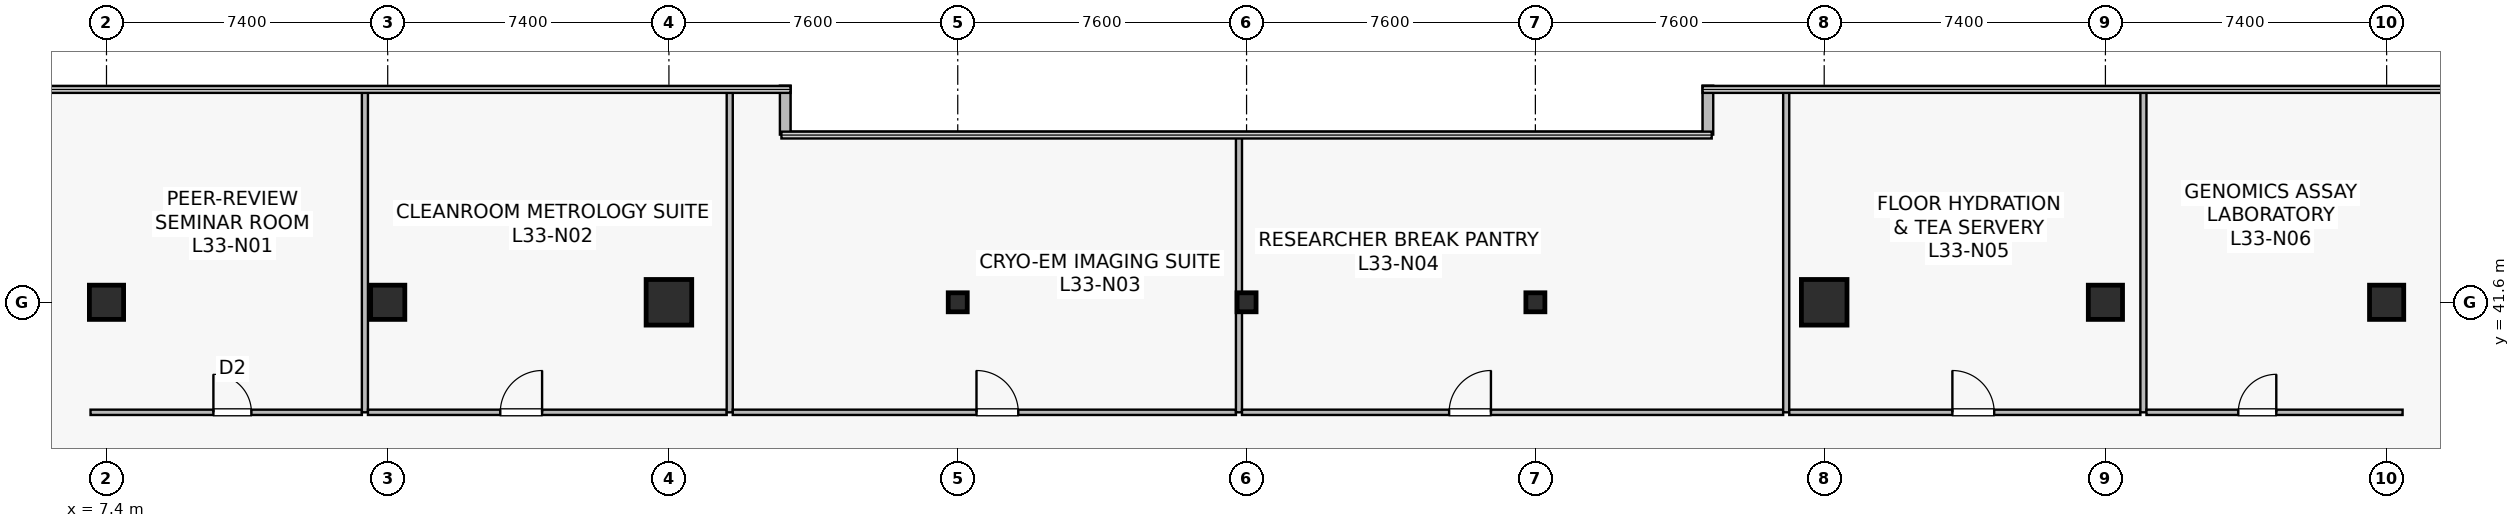
"""IFC4 building model, lengths in metres.
Left out: names, types, materials, properties, quantities, classifications, styles, units other than length and angle.
Written with IfcOpenShell. Run it as: python <this file> out.ifc"""

import sys

from ifc_helpers import new_model, si_unit, direction, frame, frame_2d, origin, origin_2d, place, context, subcontext, project, spatial, rectangle, hollow_rectangle, extrude, source, transform, mapped, element, fill, save


model = new_model("IFC4")
c1 = context("Model", 3, precision=1e-05, world=origin(), true_north=direction((0.0, 1.0)))
c2 = subcontext(c1, "Body", "Model", "MODEL_VIEW")
j1 = project(units=[si_unit("LENGTHUNIT", "METRE"), si_unit("PLANEANGLEUNIT", "RADIAN")], contexts=[c1])
p1 = place(None, origin())
s1 = spatial("IfcSite", under=j1, at=p1, CompositionType="ELEMENT")
p2 = place(p1, origin())
s2 = spatial("IfcBuilding", under=s1, at=p2, CompositionType="ELEMENT")
p3 = place(p2, frame((0.0, 0.0, 137.9)))
s3 = spatial("IfcBuildingStorey", under=s2, at=p3, CompositionType="ELEMENT", Elevation=137.9)
m1 = source(origin(), c2, "Body", "SweptSolid", [
    extrude(rectangle(XDim=0.9, YDim=0.9, at=origin_2d()), origin(), (0.0, 0.0, 1.0), 4.1),
])
p4 = place(p3, frame((14.8, 41.6, 0.0), z_axis=(0.0, 0.0, 1.0), x_axis=(1.0, 0.0, 0.0)))
e1 = element("IfcColumn", 1, at=p4, inside=s3, PredefinedType="COLUMN", context=c2, shape_type="MappedRepresentation", body=[
    mapped(m1, transform((0.0, 0.0, 0.0), scale=1.0)),
])
m2 = source(origin(), c2, "Body", "SweptSolid", [
    extrude(rectangle(XDim=1.2, YDim=1.2, at=origin_2d()), origin(), (0.0, 0.0, 1.0), 4.1),
])
for number, where, z_axis, x_axis in (
    (2, (22.2, 41.6, 0.0), (0.0, 0.0, 1.0), (1.0, 0.0, 0.0)),
    (3, (52.6, 41.6, 0.0), (0.0, 0.0, 1.0), (1.0, 0.0, 0.0)),
):
    element("IfcColumn", number, at=place(p3, frame(where, z_axis=z_axis, x_axis=x_axis)), inside=s3, PredefinedType="COLUMN", context=c2, shape_type="MappedRepresentation", body=[
        mapped(m2, transform((0.0, 0.0, 0.0), scale=1.0)),
    ])
for number, where, z_axis, x_axis in (
    (4, (60.0, 41.6, 0.0), (0.0, 0.0, 1.0), (1.0, 0.0, 0.0)),
    (5, (7.4, 41.6, 0.0), (0.0, 0.0, 1.0), (1.0, 0.0, 0.0)),
    (6, (67.4, 41.6, 0.0), (0.0, 0.0, 1.0), (1.0, 0.0, 0.0)),
):
    element("IfcColumn", number, at=place(p3, frame(where, z_axis=z_axis, x_axis=x_axis)), inside=s3, PredefinedType="COLUMN", context=c2, shape_type="MappedRepresentation", body=[
        mapped(m1, transform((0.0, 0.0, 0.0), scale=1.0)),
    ])
m3 = source(origin(), c2, "Body", "SweptSolid", [
    extrude(hollow_rectangle(XDim=0.5, YDim=0.5, WallThickness=0.022, at=origin_2d()), origin(), (0.0, 0.0, 1.0), 4.1),
])
for number, where, z_axis, x_axis in (
    (7, (29.8, 41.6, 0.0), (0.0, 0.0, 1.0), (1.0, 0.0, 0.0)),
    (8, (37.4, 41.6, 0.0), (0.0, 0.0, 1.0), (1.0, 0.0, 0.0)),
    (9, (45.0, 41.6, 0.0), (0.0, 0.0, 1.0), (1.0, 0.0, 0.0)),
):
    element("IfcColumn", number, at=place(p3, frame(where, z_axis=z_axis, x_axis=x_axis)), inside=s3, PredefinedType="COLUMN", context=c2, shape_type="MappedRepresentation", body=[
        mapped(m3, transform((0.0, 0.0, 0.0), scale=1.0)),
    ])
for number, where, z_axis, x_axis in (
    (10, (49.54, 47.3, 0.0), (0.0, 0.0, 1.0), (0.0, -1.0, 0.0)),
    (11, (25.26, 46.012, 0.0), (0.0, 0.0, 1.0), (0.0, 1.0, 0.0)),
):
    element("IfcWall", number, at=place(p3, frame(where, z_axis=z_axis, x_axis=x_axis)), inside=s3, PredefinedType="STANDARD", context=c2, shape_type="SweptSolid", body=[
        extrude(rectangle(XDim=1.288, YDim=0.28, at=frame_2d((0.644, 0.0))), origin(), (0.0, 0.0, 1.0), 3.79),
    ])
p5 = place(p3, frame((6.98, 38.705, 0.0), z_axis=(0.0, 0.0, 1.0), x_axis=(1.0, 0.0, 0.0)))
e12 = element("IfcWall", 12, at=p5, inside=s3, PredefinedType="PARTITIONING", context=c2, shape_type="SweptSolid", body=[
    extrude(rectangle(XDim=7.14, YDim=0.14, at=frame_2d((3.57, 0.0))), origin(), (0.0, 0.0, 1.0), 3.275),
])
p6 = place(p5, frame((3.233, 0.0, 0.0)))
e13 = element("IfcOpeningElement", 13, at=p6, cuts=e12, PredefinedType="OPENING", context=c2, shape_type="SweptSolid", body=[
    extrude(rectangle(XDim=1.0, YDim=2.15, at=frame_2d((0.5, 1.075))), frame((0.0, 0.08, 0.0), z_axis=(0.0, -1.0, 0.0), x_axis=(1.0, 0.0, 0.0)), (0.0, 0.0, 1.0), 0.16),
])
p7 = place(p3, frame((14.2, 38.705, 0.0), z_axis=(0.0, 0.0, 1.0), x_axis=(0.0, 1.0, 0.0)))
e14 = element("IfcWall", 14, at=p7, inside=s3, PredefinedType="PARTITIONING", context=c2, shape_type="SweptSolid", body=[
    extrude(rectangle(XDim=8.485, YDim=0.16, at=frame_2d((4.242, 0.0))), origin(), (0.0, 0.0, 1.0), 3.075),
])
p8 = place(p3, frame((14.28, 38.705, 0.0), z_axis=(0.0, 0.0, 1.0), x_axis=(1.0, 0.0, 0.0)))
e15 = element("IfcWall", 15, at=p8, inside=s3, PredefinedType="PARTITIONING", context=c2, shape_type="SweptSolid", body=[
    extrude(rectangle(XDim=9.44, YDim=0.14, at=frame_2d((4.72, 0.0))), origin(), (0.0, 0.0, 1.0), 3.125),
])
p9 = place(p8, frame((3.482, 0.0, 0.0)))
e16 = element("IfcOpeningElement", 16, at=p9, cuts=e15, PredefinedType="OPENING", context=c2, shape_type="SweptSolid", body=[
    extrude(rectangle(XDim=1.1, YDim=2.18, at=frame_2d((0.55, 1.09))), frame((0.0, 0.08, 0.0), z_axis=(0.0, -1.0, 0.0), x_axis=(1.0, 0.0, 0.0)), (0.0, 0.0, 1.0), 0.16),
])
p10 = place(p3, frame((23.8, 38.705, 0.0), z_axis=(0.0, 0.0, 1.0), x_axis=(0.0, 1.0, 0.0)))
e17 = element("IfcWall", 17, at=p10, inside=s3, PredefinedType="PARTITIONING", context=c2, shape_type="SweptSolid", body=[
    extrude(rectangle(XDim=8.485, YDim=0.16, at=frame_2d((4.242, 0.0))), origin(), (0.0, 0.0, 1.0), 3.075),
])
p11 = place(p3, frame((23.88, 38.705, 0.0), z_axis=(0.0, 0.0, 1.0), x_axis=(1.0, 0.0, 0.0)))
e18 = element("IfcWall", 18, at=p11, inside=s3, PredefinedType="PARTITIONING", context=c2, shape_type="SweptSolid", body=[
    extrude(rectangle(XDim=13.24, YDim=0.14, at=frame_2d((6.62, 0.0))), origin(), (0.0, 0.0, 1.0), 3.125),
])
p12 = place(p11, frame((6.413, 0.0, 0.0)))
e19 = element("IfcOpeningElement", 19, at=p12, cuts=e18, PredefinedType="OPENING", context=c2, shape_type="SweptSolid", body=[
    extrude(rectangle(XDim=1.1, YDim=2.18, at=frame_2d((0.55, 1.09))), frame((0.0, 0.08, 0.0), z_axis=(0.0, -1.0, 0.0), x_axis=(1.0, 0.0, 0.0)), (0.0, 0.0, 1.0), 0.16),
])
p13 = place(p3, frame((37.2, 38.705, 0.0), z_axis=(0.0, 0.0, 1.0), x_axis=(0.0, 1.0, 0.0)))
e20 = element("IfcWall", 20, at=p13, inside=s3, PredefinedType="PARTITIONING", context=c2, shape_type="SweptSolid", body=[
    extrude(rectangle(XDim=7.285, YDim=0.16, at=frame_2d((3.643, 0.0))), origin(), (0.0, 0.0, 1.0), 3.075),
])
p14 = place(p3, frame((37.28, 38.705, 0.0), z_axis=(0.0, 0.0, 1.0), x_axis=(1.0, 0.0, 0.0)))
e21 = element("IfcWall", 21, at=p14, inside=s3, PredefinedType="PARTITIONING", context=c2, shape_type="SweptSolid", body=[
    extrude(rectangle(XDim=14.24, YDim=0.14, at=frame_2d((7.12, 0.0))), origin(), (0.0, 0.0, 1.0), 3.125),
])
p15 = place(p14, frame((5.45, 0.0, 0.0)))
e22 = element("IfcOpeningElement", 22, at=p15, cuts=e21, PredefinedType="OPENING", context=c2, shape_type="SweptSolid", body=[
    extrude(rectangle(XDim=1.1, YDim=2.18, at=frame_2d((0.55, 1.09))), frame((0.0, 0.08, 0.0), z_axis=(0.0, -1.0, 0.0), x_axis=(1.0, 0.0, 0.0)), (0.0, 0.0, 1.0), 0.16),
])
p16 = place(p3, frame((51.6, 38.705, 0.0), z_axis=(0.0, 0.0, 1.0), x_axis=(0.0, 1.0, 0.0)))
e23 = element("IfcWall", 23, at=p16, inside=s3, PredefinedType="PARTITIONING", context=c2, shape_type="SweptSolid", body=[
    extrude(rectangle(XDim=8.485, YDim=0.16, at=frame_2d((4.242, 0.0))), origin(), (0.0, 0.0, 1.0), 3.075),
])
p17 = place(p3, frame((51.68, 38.705, 0.0), z_axis=(0.0, 0.0, 1.0), x_axis=(1.0, 0.0, 0.0)))
e24 = element("IfcWall", 24, at=p17, inside=s3, PredefinedType="PARTITIONING", context=c2, shape_type="SweptSolid", body=[
    extrude(rectangle(XDim=9.24, YDim=0.14, at=frame_2d((4.62, 0.0))), origin(), (0.0, 0.0, 1.0), 3.125),
])
p18 = place(p17, frame((4.293, 0.0, 0.0)))
e25 = element("IfcOpeningElement", 25, at=p18, cuts=e24, PredefinedType="OPENING", context=c2, shape_type="SweptSolid", body=[
    extrude(rectangle(XDim=1.1, YDim=2.18, at=frame_2d((0.55, 1.09))), frame((0.0, 0.08, 0.0), z_axis=(0.0, -1.0, 0.0), x_axis=(1.0, 0.0, 0.0)), (0.0, 0.0, 1.0), 0.16),
])
p19 = place(p3, frame((61.0, 38.705, 0.0), z_axis=(0.0, 0.0, 1.0), x_axis=(0.0, 1.0, 0.0)))
e26 = element("IfcWall", 26, at=p19, inside=s3, PredefinedType="PARTITIONING", context=c2, shape_type="SweptSolid", body=[
    extrude(rectangle(XDim=8.485, YDim=0.16, at=frame_2d((4.242, 0.0))), origin(), (0.0, 0.0, 1.0), 3.075),
])
p20 = place(p3, frame((61.08, 38.705, 0.0), z_axis=(0.0, 0.0, 1.0), x_axis=(1.0, 0.0, 0.0)))
e27 = element("IfcWall", 27, at=p20, inside=s3, PredefinedType="PARTITIONING", context=c2, shape_type="SweptSolid", body=[
    extrude(rectangle(XDim=6.74, YDim=0.14, at=frame_2d((3.37, 0.0))), origin(), (0.0, 0.0, 1.0), 3.275),
])
p21 = place(p20, frame((2.417, 0.0, 0.0)))
e28 = element("IfcOpeningElement", 28, at=p21, cuts=e27, PredefinedType="OPENING", context=c2, shape_type="SweptSolid", body=[
    extrude(rectangle(XDim=1.0, YDim=2.15, at=frame_2d((0.5, 1.075))), frame((0.0, 0.08, 0.0), z_axis=(0.0, -1.0, 0.0), x_axis=(1.0, 0.0, 0.0)), (0.0, 0.0, 1.0), 0.16),
])
m4 = source(origin(), c2, "Body", "SweptSolid", [
    extrude(rectangle(XDim=1.0, YDim=2.15, at=frame_2d((0.5, 1.075))), frame((0.0, 0.025, 0.0), z_axis=(0.0, -1.0, 0.0), x_axis=(1.0, 0.0, 0.0)), (0.0, 0.0, 1.0), 0.05),
])
p22 = place(p6, origin())
e29 = element("IfcDoor", 29, at=p22, inside=s3, OperationType="SINGLE_SWING_LEFT", PredefinedType="DOOR", context=c2, shape_type="MappedRepresentation", body=[
    mapped(m4, transform((0.0, 0.0, 0.0), scale=1.0)),
])
fill(e13, e29)
m5 = source(origin(), c2, "Body", "SweptSolid", [
    extrude(rectangle(XDim=1.1, YDim=2.18, at=frame_2d((0.55, 1.09))), frame((0.0, 0.025, 0.0), z_axis=(0.0, -1.0, 0.0), x_axis=(1.0, 0.0, 0.0)), (0.0, 0.0, 1.0), 0.05),
])
p23 = place(p9, origin())
e30 = element("IfcDoor", 30, at=p23, inside=s3, OperationType="SINGLE_SWING_RIGHT", PredefinedType="DOOR", context=c2, shape_type="MappedRepresentation", body=[
    mapped(m5, transform((0.0, 0.0, 0.0), scale=1.0)),
])
fill(e16, e30)
p24 = place(p12, origin())
e31 = element("IfcDoor", 31, at=p24, inside=s3, OperationType="SINGLE_SWING_LEFT", PredefinedType="DOOR", context=c2, shape_type="MappedRepresentation", body=[
    mapped(m5, transform((0.0, 0.0, 0.0), scale=1.0)),
])
fill(e19, e31)
p25 = place(p15, origin())
e32 = element("IfcDoor", 32, at=p25, inside=s3, OperationType="SINGLE_SWING_RIGHT", PredefinedType="DOOR", context=c2, shape_type="MappedRepresentation", body=[
    mapped(m5, transform((0.0, 0.0, 0.0), scale=1.0)),
])
fill(e22, e32)
p26 = place(p18, origin())
e33 = element("IfcDoor", 33, at=p26, inside=s3, OperationType="SINGLE_SWING_LEFT", PredefinedType="DOOR", context=c2, shape_type="MappedRepresentation", body=[
    mapped(m5, transform((0.0, 0.0, 0.0), scale=1.0)),
])
fill(e25, e33)
p27 = place(p21, origin())
e34 = element("IfcDoor", 34, at=p27, inside=s3, OperationType="SINGLE_SWING_RIGHT", PredefinedType="DOOR", context=c2, shape_type="MappedRepresentation", body=[
    mapped(m4, transform((0.0, 0.0, 0.0), scale=1.0)),
])
fill(e28, e34)
save(model, sys.argv[1])
